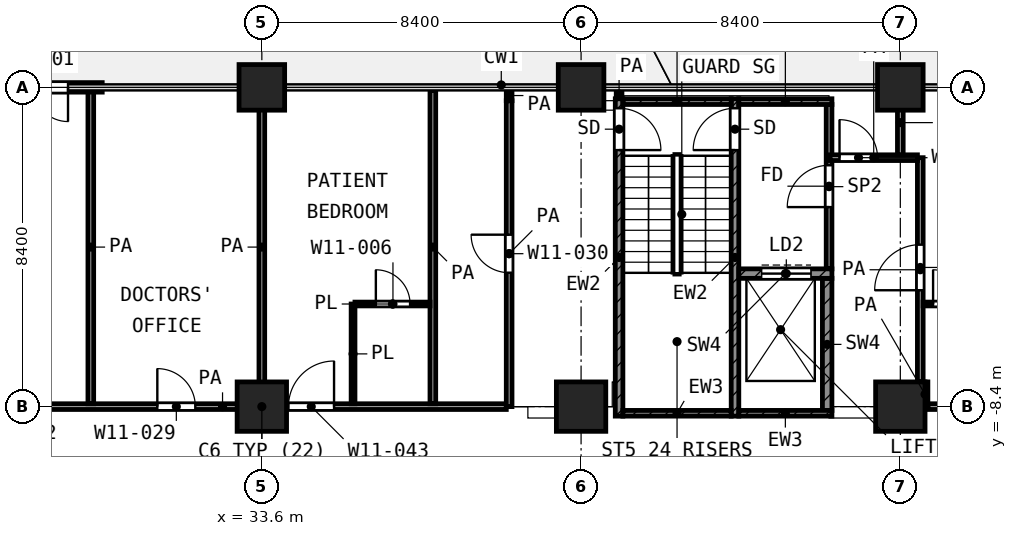
"""IFC4 building model, lengths in metres.
Left out: names, types, materials, properties, quantities, classifications, styles, units other than length and angle.
Written with IfcOpenShell. Run it as: python <this file> out.ifc"""

import sys

from ifc_helpers import new_model, si_unit, direction, frame, frame_2d, origin, origin_2d, place, context, subcontext, project, spatial, rectangle, extrude, element, fill, save


model = new_model("IFC4")
c1 = context("Model", 3, precision=1e-05, world=origin(), true_north=direction((0.0, 1.0)))
c2 = subcontext(c1, "Body", "Model", "MODEL_VIEW")
j1 = project(units=[si_unit("LENGTHUNIT", "METRE"), si_unit("PLANEANGLEUNIT", "RADIAN")], contexts=[c1])
p1 = place(None, origin())
s1 = spatial("IfcSite", under=j1, at=p1, CompositionType="ELEMENT")
p2 = place(p1, origin())
s2 = spatial("IfcBuilding", under=s1, at=p2, CompositionType="ELEMENT")
p3 = place(p2, frame((0.0, 0.0, 51.8)))
s3 = spatial("IfcBuildingStorey", under=s2, at=p3, CompositionType="ELEMENT", Elevation=51.8)
for number, where, z_axis, x_axis in (
    (1, (33.6, 0.0, 0.0), (0.0, 0.0, 1.0), (1.0, 0.0, 0.0)),
    (2, (42.0, 0.0, 0.0), (0.0, 0.0, 1.0), (1.0, 0.0, 0.0)),
    (3, (50.4, 0.0, 0.0), (0.0, 0.0, 1.0), (1.0, 0.0, 0.0)),
):
    element("IfcColumn", number, at=place(p3, frame(where, z_axis=z_axis, x_axis=x_axis)), inside=s3, PredefinedType="COLUMN", context=c2, shape_type="SweptSolid", body=[
        extrude(rectangle(XDim=1.2, YDim=1.2, at=origin_2d()), origin(), (0.0, 0.0, 1.0), 4.2),
    ])
for number, where, z_axis, x_axis in (
    (4, (33.6, -8.4, 0.0), (0.0, 0.0, 1.0), (1.0, 0.0, 0.0)),
    (5, (42.0, -8.4, 0.0), (0.0, 0.0, 1.0), (1.0, 0.0, 0.0)),
    (6, (50.4, -8.4, 0.0), (0.0, 0.0, 1.0), (1.0, 0.0, 0.0)),
):
    element("IfcColumn", number, at=place(p3, frame(where, z_axis=z_axis, x_axis=x_axis)), inside=s3, PredefinedType="COLUMN", context=c2, shape_type="SweptSolid", body=[
        extrude(rectangle(XDim=1.3, YDim=1.3, at=origin_2d()), origin(), (0.0, 0.0, 1.0), 4.2),
    ])
p4 = place(p3, frame((29.4, 0.0, 0.0), z_axis=(0.0, 0.0, 1.0), x_axis=(-1.0, 0.0, 0.0)))
e7 = element("IfcWall", 7, at=p4, inside=s3, PredefinedType="SOLIDWALL", context=c2, shape_type="SweptSolid", body=[
    extrude(rectangle(XDim=3.6, YDim=0.25, at=frame_2d((1.8, 0.0))), origin(), (0.0, 0.0, 1.0), 3.78),
])
p5 = place(p4, frame((0.9, 0.0, 0.0)))
e8 = element("IfcOpeningElement", 8, at=p5, cuts=e7, PredefinedType="OPENING", context=c2, shape_type="SweptSolid", body=[
    extrude(rectangle(XDim=1.8, YDim=2.1, at=frame_2d((0.9, 1.05))), frame((0.0, 0.135, 0.0), z_axis=(0.0, -1.0, 0.0), x_axis=(1.0, 0.0, 0.0)), (0.0, 0.0, 1.0), 0.27),
])
p6 = place(p3, frame((43.0, -8.65, 0.0), z_axis=(0.0, 0.0, 1.0), x_axis=(0.0, 1.0, 0.0)))
e9 = element("IfcWall", 9, at=p6, inside=s3, PredefinedType="SHEAR", context=c2, shape_type="SweptSolid", body=[
    extrude(rectangle(XDim=8.35, YDim=0.2, at=frame_2d((4.175, 0.0))), origin(), (0.0, 0.0, 1.0), 3.9),
])
p7 = place(p6, frame((7.0, 0.0, 0.0)))
e10 = element("IfcOpeningElement", 10, at=p7, cuts=e9, PredefinedType="OPENING", context=c2, shape_type="SweptSolid", body=[
    extrude(rectangle(XDim=1.1, YDim=2.1, at=frame_2d((0.55, 1.05))), frame((0.0, 0.11, 0.0), z_axis=(0.0, -1.0, 0.0), x_axis=(1.0, 0.0, 0.0)), (0.0, 0.0, 1.0), 0.22),
])
p8 = place(p3, frame((46.05, -8.65, 0.0), z_axis=(0.0, 0.0, 1.0), x_axis=(0.0, 1.0, 0.0)))
e11 = element("IfcWall", 11, at=p8, inside=s3, PredefinedType="SHEAR", context=c2, shape_type="SweptSolid", body=[
    extrude(rectangle(XDim=8.35, YDim=0.2, at=frame_2d((4.175, 0.0))), origin(), (0.0, 0.0, 1.0), 3.9),
])
p9 = place(p8, frame((7.0, 0.0, 0.0)))
e12 = element("IfcOpeningElement", 12, at=p9, cuts=e11, PredefinedType="OPENING", context=c2, shape_type="SweptSolid", body=[
    extrude(rectangle(XDim=1.1, YDim=2.1, at=frame_2d((0.55, 1.05))), frame((0.0, 0.11, 0.0), z_axis=(0.0, -1.0, 0.0), x_axis=(1.0, 0.0, 0.0)), (0.0, 0.0, 1.0), 0.22),
])
p10 = place(p3, frame((43.1, -0.375, 0.0), z_axis=(0.0, 0.0, 1.0), x_axis=(1.0, 0.0, 0.0)))
e13 = element("IfcWall", 13, at=p10, inside=s3, PredefinedType="SHEAR", context=c2, shape_type="SweptSolid", body=[
    extrude(rectangle(XDim=2.85, YDim=0.15, at=frame_2d((1.425, 0.0))), origin(), (0.0, 0.0, 1.0), 3.9),
])
p11 = place(p3, frame((46.15, -0.375, 0.0), z_axis=(0.0, 0.0, 1.0), x_axis=(1.0, 0.0, 0.0)))
e14 = element("IfcWall", 14, at=p11, inside=s3, PredefinedType="SHEAR", context=c2, shape_type="SweptSolid", body=[
    extrude(rectangle(XDim=2.45, YDim=0.15, at=frame_2d((1.225, 0.0))), origin(), (0.0, 0.0, 1.0), 3.9),
])
p12 = place(p3, frame((43.1, -8.575, 0.0), z_axis=(0.0, 0.0, 1.0), x_axis=(1.0, 0.0, 0.0)))
e15 = element("IfcWall", 15, at=p12, inside=s3, PredefinedType="SHEAR", context=c2, shape_type="SweptSolid", body=[
    extrude(rectangle(XDim=2.85, YDim=0.15, at=frame_2d((1.425, 0.0))), origin(), (0.0, 0.0, 1.0), 3.9),
])
p13 = place(p3, frame((46.15, -8.575, 0.0), z_axis=(0.0, 0.0, 1.0), x_axis=(1.0, 0.0, 0.0)))
e16 = element("IfcWall", 16, at=p13, inside=s3, PredefinedType="SHEAR", context=c2, shape_type="SweptSolid", body=[
    extrude(rectangle(XDim=2.45, YDim=0.15, at=frame_2d((1.225, 0.0))), origin(), (0.0, 0.0, 1.0), 3.9),
])
p14 = place(p3, frame((46.15, -4.9, 0.0), z_axis=(0.0, 0.0, 1.0), x_axis=(1.0, 0.0, 0.0)))
e17 = element("IfcWall", 17, at=p14, inside=s3, PredefinedType="SHEAR", context=c2, shape_type="SweptSolid", body=[
    extrude(rectangle(XDim=2.45, YDim=0.25, at=frame_2d((1.225, 0.0))), origin(), (0.0, 0.0, 1.0), 3.9),
])
p15 = place(p14, frame((0.6, 0.0, 0.0)))
e18 = element("IfcOpeningElement", 18, at=p15, cuts=e17, PredefinedType="OPENING", context=c2, shape_type="SweptSolid", body=[
    extrude(rectangle(XDim=1.3, YDim=2.1, at=frame_2d((0.65, 1.05))), frame((0.0, 0.135, 0.0), z_axis=(0.0, -1.0, 0.0), x_axis=(1.0, 0.0, 0.0)), (0.0, 0.0, 1.0), 0.27),
])
p16 = place(p3, frame((48.475, -8.5, 0.0), z_axis=(0.0, 0.0, 1.0), x_axis=(0.0, 1.0, 0.0)))
e19 = element("IfcWall", 19, at=p16, inside=s3, PredefinedType="SHEAR", context=c2, shape_type="SweptSolid", body=[
    extrude(rectangle(XDim=3.475, YDim=0.25, at=frame_2d((1.738, 0.0))), origin(), (0.0, 0.0, 1.0), 3.9),
])
p17 = place(p3, frame((48.525, -4.775, 0.0), z_axis=(0.0, 0.0, 1.0), x_axis=(0.0, 1.0, 0.0)))
e20 = element("IfcWall", 20, at=p17, inside=s3, PredefinedType="PARTITIONING", context=c2, shape_type="SweptSolid", body=[
    extrude(rectangle(XDim=4.325, YDim=0.15, at=frame_2d((2.163, 0.0))), origin(), (0.0, 0.0, 1.0), 3.9),
])
p18 = place(p17, frame((1.625, 0.0, 0.0)))
e21 = element("IfcOpeningElement", 21, at=p18, cuts=e20, PredefinedType="OPENING", context=c2, shape_type="SweptSolid", body=[
    extrude(rectangle(XDim=1.1, YDim=2.1, at=frame_2d((0.55, 1.05))), frame((0.0, 0.085, 0.0), z_axis=(0.0, -1.0, 0.0), x_axis=(1.0, 0.0, 0.0)), (0.0, 0.0, 1.0), 0.17),
])
p19 = place(p3, frame((36.05, -5.7, 0.0), z_axis=(0.0, 0.0, 1.0), x_axis=(1.0, 0.0, 0.0)))
e22 = element("IfcWall", 22, at=p19, inside=s3, PredefinedType="PARTITIONING", context=c2, shape_type="SweptSolid", body=[
    extrude(rectangle(XDim=1.975, YDim=0.1, at=frame_2d((0.987, 0.0))), origin(), (0.0, 0.0, 1.0), 3.9),
])
p20 = place(p19, frame((0.55, 0.0, 0.0)))
e23 = element("IfcOpeningElement", 23, at=p20, cuts=e22, PredefinedType="OPENING", context=c2, shape_type="SweptSolid", body=[
    extrude(rectangle(XDim=0.9, YDim=2.1, at=frame_2d((0.45, 1.05))), frame((0.0, 0.06, 0.0), z_axis=(0.0, -1.0, 0.0), x_axis=(1.0, 0.0, 0.0)), (0.0, 0.0, 1.0), 0.12),
])
p21 = place(p3, frame((51.0, -5.7, 0.0), z_axis=(0.0, 0.0, 1.0), x_axis=(1.0, 0.0, 0.0)))
e24 = element("IfcWall", 24, at=p21, inside=s3, PredefinedType="PARTITIONING", context=c2, shape_type="SweptSolid", body=[
    extrude(rectangle(XDim=1.45, YDim=0.1, at=frame_2d((0.725, 0.0))), origin(), (0.0, 0.0, 1.0), 3.9),
])
p22 = place(p21, frame((0.262, 0.0, 0.0)))
e25 = element("IfcOpeningElement", 25, at=p22, cuts=e24, PredefinedType="OPENING", context=c2, shape_type="SweptSolid", body=[
    extrude(rectangle(XDim=0.9, YDim=2.1, at=frame_2d((0.45, 1.05))), frame((0.0, 0.06, 0.0), z_axis=(0.0, -1.0, 0.0), x_axis=(1.0, 0.0, 0.0)), (0.0, 0.0, 1.0), 0.12),
])
p23 = place(p3, frame((36.0, -8.325, 0.0), z_axis=(0.0, 0.0, 1.0), x_axis=(0.0, 1.0, 0.0)))
e26 = element("IfcWall", 26, at=p23, inside=s3, PredefinedType="PARTITIONING", context=c2, shape_type="SweptSolid", body=[
    extrude(rectangle(XDim=2.625, YDim=0.1, at=frame_2d((1.312, 0.0))), origin(), (0.0, 0.0, 1.0), 3.9),
])
p24 = place(p3, frame((25.1, -8.4, 0.0), z_axis=(0.0, 0.0, 1.0), x_axis=(1.0, 0.0, 0.0)))
e27 = element("IfcWall", 27, at=p24, inside=s3, PredefinedType="PARTITIONING", context=c2, shape_type="SweptSolid", body=[
    extrude(rectangle(XDim=14.932, YDim=0.15, at=frame_2d((7.466, 0.0))), origin(), (0.0, 0.0, 1.0), 3.9),
])
p25 = place(p24, frame((1.45, 0.0, 0.0)))
e28 = element("IfcOpeningElement", 28, at=p25, cuts=e27, PredefinedType="OPENING", context=c2, shape_type="SweptSolid", body=[
    extrude(rectangle(XDim=1.2, YDim=2.1, at=frame_2d((0.6, 1.05))), frame((0.0, 0.085, 0.0), z_axis=(0.0, -1.0, 0.0), x_axis=(1.0, 0.0, 0.0)), (0.0, 0.0, 1.0), 0.17),
])
p26 = place(p24, frame((5.75, 0.0, 0.0)))
e29 = element("IfcOpeningElement", 29, at=p26, cuts=e27, PredefinedType="OPENING", context=c2, shape_type="SweptSolid", body=[
    extrude(rectangle(XDim=1.0, YDim=2.1, at=frame_2d((0.5, 1.05))), frame((0.0, 0.085, 0.0), z_axis=(0.0, -1.0, 0.0), x_axis=(1.0, 0.0, 0.0)), (0.0, 0.0, 1.0), 0.17),
])
p27 = place(p24, frame((9.2, 0.0, 0.0)))
e30 = element("IfcOpeningElement", 30, at=p27, cuts=e27, PredefinedType="OPENING", context=c2, shape_type="SweptSolid", body=[
    extrude(rectangle(XDim=1.2, YDim=2.1, at=frame_2d((0.6, 1.05))), frame((0.0, 0.085, 0.0), z_axis=(0.0, -1.0, 0.0), x_axis=(1.0, 0.0, 0.0)), (0.0, 0.0, 1.0), 0.17),
])
p28 = place(p3, frame((51.125, -8.4, 0.0), z_axis=(0.0, 0.0, 1.0), x_axis=(1.0, 0.0, 0.0)))
e31 = element("IfcWall", 31, at=p28, inside=s3, PredefinedType="PARTITIONING", context=c2, shape_type="SweptSolid", body=[
    extrude(rectangle(XDim=28.595, YDim=0.15, at=frame_2d((14.297, 0.0))), origin(), (0.0, 0.0, 1.0), 3.9),
])
p29 = place(p28, frame((1.825, 0.0, 0.0)))
e32 = element("IfcOpeningElement", 32, at=p29, cuts=e31, PredefinedType="OPENING", context=c2, shape_type="SweptSolid", body=[
    extrude(rectangle(XDim=1.2, YDim=2.1, at=frame_2d((0.6, 1.05))), frame((0.0, 0.085, 0.0), z_axis=(0.0, -1.0, 0.0), x_axis=(1.0, 0.0, 0.0)), (0.0, 0.0, 1.0), 0.17),
])
p30 = place(p28, frame((3.375, 0.0, 0.0)))
e33 = element("IfcOpeningElement", 33, at=p30, cuts=e31, PredefinedType="OPENING", context=c2, shape_type="SweptSolid", body=[
    extrude(rectangle(XDim=1.2, YDim=2.1, at=frame_2d((0.6, 1.05))), frame((0.0, 0.085, 0.0), z_axis=(0.0, -1.0, 0.0), x_axis=(1.0, 0.0, 0.0)), (0.0, 0.0, 1.0), 0.17),
])
p31 = place(p28, frame((5.775, 0.0, 0.0)))
e34 = element("IfcOpeningElement", 34, at=p31, cuts=e31, PredefinedType="OPENING", context=c2, shape_type="SweptSolid", body=[
    extrude(rectangle(XDim=1.2, YDim=2.1, at=frame_2d((0.6, 1.05))), frame((0.0, 0.085, 0.0), z_axis=(0.0, -1.0, 0.0), x_axis=(1.0, 0.0, 0.0)), (0.0, 0.0, 1.0), 0.17),
])
p32 = place(p28, frame((8.375, 0.0, 0.0)))
e35 = element("IfcOpeningElement", 35, at=p32, cuts=e31, PredefinedType="OPENING", context=c2, shape_type="SweptSolid", body=[
    extrude(rectangle(XDim=1.2, YDim=2.1, at=frame_2d((0.6, 1.05))), frame((0.0, 0.085, 0.0), z_axis=(0.0, -1.0, 0.0), x_axis=(1.0, 0.0, 0.0)), (0.0, 0.0, 1.0), 0.17),
])
p33 = place(p28, frame((13.675, 0.0, 0.0)))
e36 = element("IfcOpeningElement", 36, at=p33, cuts=e31, PredefinedType="OPENING", context=c2, shape_type="SweptSolid", body=[
    extrude(rectangle(XDim=1.2, YDim=2.1, at=frame_2d((0.6, 1.05))), frame((0.0, 0.085, 0.0), z_axis=(0.0, -1.0, 0.0), x_axis=(1.0, 0.0, 0.0)), (0.0, 0.0, 1.0), 0.17),
])
p34 = place(p28, frame((16.775, 0.0, 0.0)))
e37 = element("IfcOpeningElement", 37, at=p34, cuts=e31, PredefinedType="OPENING", context=c2, shape_type="SweptSolid", body=[
    extrude(rectangle(XDim=0.9, YDim=2.1, at=frame_2d((0.45, 1.05))), frame((0.0, 0.085, 0.0), z_axis=(0.0, -1.0, 0.0), x_axis=(1.0, 0.0, 0.0)), (0.0, 0.0, 1.0), 0.17),
])
p35 = place(p28, frame((22.275, 0.0, 0.0)))
e38 = element("IfcOpeningElement", 38, at=p35, cuts=e31, PredefinedType="OPENING", context=c2, shape_type="SweptSolid", body=[
    extrude(rectangle(XDim=1.5, YDim=2.1, at=frame_2d((0.75, 1.05))), frame((0.0, 0.085, 0.0), z_axis=(0.0, -1.0, 0.0), x_axis=(1.0, 0.0, 0.0)), (0.0, 0.0, 1.0), 0.17),
])
p36 = place(p3, frame((48.55, -1.85, 0.0), z_axis=(0.0, 0.0, 1.0), x_axis=(1.0, 0.0, 0.0)))
e39 = element("IfcWall", 39, at=p36, inside=s3, PredefinedType="PARTITIONING", context=c2, shape_type="SweptSolid", body=[
    extrude(rectangle(XDim=2.3, YDim=0.15, at=frame_2d((1.15, 0.0))), origin(), (0.0, 0.0, 1.0), 3.9),
])
p37 = place(p36, frame((0.25, 0.0, 0.0)))
e40 = element("IfcOpeningElement", 40, at=p37, cuts=e39, PredefinedType="OPENING", context=c2, shape_type="SweptSolid", body=[
    extrude(rectangle(XDim=1.0, YDim=2.1, at=frame_2d((0.5, 1.05))), frame((0.0, 0.085, 0.0), z_axis=(0.0, -1.0, 0.0), x_axis=(1.0, 0.0, 0.0)), (0.0, 0.0, 1.0), 0.17),
])
for number, where, z_axis, x_axis in (
    (41, (29.1, -8.325, 0.0), (0.0, 0.0, 1.0), (0.0, 1.0, 0.0)),
    (42, (33.6, -8.325, 0.0), (0.0, 0.0, 1.0), (0.0, 1.0, 0.0)),
    (43, (38.1, -8.325, 0.0), (0.0, 0.0, 1.0), (0.0, 1.0, 0.0)),
):
    element("IfcWall", number, at=place(p3, frame(where, z_axis=z_axis, x_axis=x_axis)), inside=s3, PredefinedType="PARTITIONING", context=c2, shape_type="SweptSolid", body=[
        extrude(rectangle(XDim=8.245, YDim=0.15, at=frame_2d((4.123, 0.0))), origin(), (0.0, 0.0, 1.0), 3.9),
    ])
p38 = place(p3, frame((40.107, -8.4, 0.0), z_axis=(0.0, 0.0, 1.0), x_axis=(0.0, 1.0, 0.0)))
e44 = element("IfcWall", 44, at=p38, inside=s3, PredefinedType="PARTITIONING", context=c2, shape_type="SweptSolid", body=[
    extrude(rectangle(XDim=8.048, YDim=0.15, at=frame_2d((4.024, 0.0))), origin(), (0.0, 0.0, 1.0), 3.9),
])
p39 = place(p38, frame((3.524, 0.0, 0.0)))
e45 = element("IfcOpeningElement", 45, at=p39, cuts=e44, PredefinedType="OPENING", context=c2, shape_type="SweptSolid", body=[
    extrude(rectangle(XDim=1.0, YDim=2.1, at=frame_2d((0.5, 1.05))), frame((0.0, 0.085, 0.0), z_axis=(0.0, -1.0, 0.0), x_axis=(1.0, 0.0, 0.0)), (0.0, 0.0, 1.0), 0.17),
])
p40 = place(p3, frame((40.107, -0.35, 0.0), z_axis=(0.0, 0.0, 1.0), x_axis=(0.0, 1.0, 0.0)))
e46 = element("IfcWall", 46, at=p40, inside=s3, PredefinedType="PARTITIONING", context=c2, shape_type="SweptSolid", body=[
    extrude(rectangle(XDim=0.27, YDim=0.15, at=frame_2d((0.135, 0.0))), origin(), (0.0, 0.0, 1.0), 3.9),
])
p41 = place(p3, frame((43.0, -0.27, 0.0), z_axis=(0.0, 0.0, 1.0), x_axis=(0.0, 1.0, 0.0)))
e47 = element("IfcWall", 47, at=p41, inside=s3, PredefinedType="PARTITIONING", context=c2, shape_type="SweptSolid", body=[
    extrude(rectangle(XDim=0.19, YDim=0.15, at=frame_2d((0.095, 0.0))), origin(), (0.0, 0.0, 1.0), 3.9),
])
p42 = place(p3, frame((50.4, -1.775, 0.0), z_axis=(0.0, 0.0, 1.0), x_axis=(0.0, 1.0, 0.0)))
e48 = element("IfcWall", 48, at=p42, inside=s3, PredefinedType="PARTITIONING", context=c2, shape_type="SweptSolid", body=[
    extrude(rectangle(XDim=1.695, YDim=0.15, at=frame_2d((0.847, 0.0))), origin(), (0.0, 0.0, 1.0), 3.9),
])
p43 = place(p3, frame((50.925, -7.748, 0.0), z_axis=(0.0, 0.0, 1.0), x_axis=(0.0, 1.0, 0.0)))
e49 = element("IfcWall", 49, at=p43, inside=s3, PredefinedType="PARTITIONING", context=c2, shape_type="SweptSolid", body=[
    extrude(rectangle(XDim=5.898, YDim=0.15, at=frame_2d((2.949, 0.0))), origin(), (0.0, 0.0, 1.0), 3.9),
])
p44 = place(p43, frame((2.41, 0.0, 0.0)))
e50 = element("IfcOpeningElement", 50, at=p44, cuts=e49, PredefinedType="OPENING", context=c2, shape_type="SweptSolid", body=[
    extrude(rectangle(XDim=1.2, YDim=2.1, at=frame_2d((0.6, 1.05))), frame((0.0, 0.085, 0.0), z_axis=(0.0, -1.0, 0.0), x_axis=(1.0, 0.0, 0.0)), (0.0, 0.0, 1.0), 0.17),
])
p45 = place(p3, frame((51.05, -8.4, 0.0), z_axis=(0.0, 0.0, 1.0), x_axis=(0.0, 1.0, 0.0)))
e51 = element("IfcWall", 51, at=p45, inside=s3, PredefinedType="PARTITIONING", context=c2, shape_type="SweptSolid", body=[
    extrude(rectangle(XDim=0.65, YDim=0.15, at=frame_2d((0.325, 0.0))), origin(), (0.0, 0.0, 1.0), 3.9),
])
p46 = place(p5, origin())
e52 = element("IfcDoor", 52, at=p46, inside=s3, OperationType="DOUBLE_DOOR_SINGLE_SWING", PredefinedType="DOOR", context=c2, shape_type="SweptSolid", body=[
    extrude(rectangle(XDim=1.8, YDim=2.1, at=frame_2d((0.9, 1.05))), frame((0.0, 0.025, 0.0), z_axis=(0.0, -1.0, 0.0), x_axis=(1.0, 0.0, 0.0)), (0.0, 0.0, 1.0), 0.05),
])
fill(e8, e52)
p47 = place(p7, frame((1.1, 0.0, 0.0), z_axis=(0.0, 0.0, 1.0), x_axis=(-1.0, 0.0, 0.0)))
e53 = element("IfcDoor", 53, at=p47, inside=s3, OperationType="SINGLE_SWING_LEFT", PredefinedType="DOOR", context=c2, shape_type="SweptSolid", body=[
    extrude(rectangle(XDim=1.1, YDim=2.1, at=frame_2d((0.55, 1.05))), frame((0.0, 0.025, 0.0), z_axis=(0.0, -1.0, 0.0), x_axis=(1.0, 0.0, 0.0)), (0.0, 0.0, 1.0), 0.05),
])
fill(e10, e53)
p48 = place(p9, origin())
e54 = element("IfcDoor", 54, at=p48, inside=s3, OperationType="SINGLE_SWING_LEFT", PredefinedType="DOOR", context=c2, shape_type="SweptSolid", body=[
    extrude(rectangle(XDim=1.1, YDim=2.1, at=frame_2d((0.55, 1.05))), frame((0.0, 0.025, 0.0), z_axis=(0.0, -1.0, 0.0), x_axis=(1.0, 0.0, 0.0)), (0.0, 0.0, 1.0), 0.05),
])
fill(e12, e54)
p49 = place(p15, origin())
e55 = element("IfcDoor", 55, at=p49, inside=s3, OperationType="DOUBLE_DOOR_SLIDING", PredefinedType="DOOR", context=c2, shape_type="SweptSolid", body=[
    extrude(rectangle(XDim=1.3, YDim=2.1, at=frame_2d((0.65, 1.05))), frame((0.0, 0.025, 0.0), z_axis=(0.0, -1.0, 0.0), x_axis=(1.0, 0.0, 0.0)), (0.0, 0.0, 1.0), 0.05),
])
fill(e18, e55)
p50 = place(p18, origin())
e56 = element("IfcDoor", 56, at=p50, inside=s3, OperationType="SINGLE_SWING_LEFT", PredefinedType="DOOR", context=c2, shape_type="SweptSolid", body=[
    extrude(rectangle(XDim=1.1, YDim=2.1, at=frame_2d((0.55, 1.05))), frame((0.0, 0.025, 0.0), z_axis=(0.0, -1.0, 0.0), x_axis=(1.0, 0.0, 0.0)), (0.0, 0.0, 1.0), 0.05),
])
fill(e21, e56)
p51 = place(p26, origin())
e57 = element("IfcDoor", 57, at=p51, inside=s3, OperationType="SINGLE_SWING_LEFT", PredefinedType="DOOR", context=c2, shape_type="SweptSolid", body=[
    extrude(rectangle(XDim=1.0, YDim=2.1, at=frame_2d((0.5, 1.05))), frame((0.0, 0.025, 0.0), z_axis=(0.0, -1.0, 0.0), x_axis=(1.0, 0.0, 0.0)), (0.0, 0.0, 1.0), 0.05),
])
fill(e29, e57)
p52 = place(p27, origin())
e58 = element("IfcDoor", 58, at=p52, inside=s3, OperationType="SINGLE_SWING_RIGHT", PredefinedType="DOOR", context=c2, shape_type="SweptSolid", body=[
    extrude(rectangle(XDim=1.2, YDim=2.1, at=frame_2d((0.6, 1.05))), frame((0.0, 0.025, 0.0), z_axis=(0.0, -1.0, 0.0), x_axis=(1.0, 0.0, 0.0)), (0.0, 0.0, 1.0), 0.05),
])
fill(e30, e58)
p53 = place(p20, origin())
e59 = element("IfcDoor", 59, at=p53, inside=s3, OperationType="SINGLE_SWING_LEFT", PredefinedType="DOOR", context=c2, shape_type="SweptSolid", body=[
    extrude(rectangle(XDim=0.9, YDim=2.1, at=frame_2d((0.45, 1.05))), frame((0.0, 0.025, 0.0), z_axis=(0.0, -1.0, 0.0), x_axis=(1.0, 0.0, 0.0)), (0.0, 0.0, 1.0), 0.05),
])
fill(e23, e59)
p54 = place(p39, origin())
e60 = element("IfcDoor", 60, at=p54, inside=s3, OperationType="SINGLE_SWING_RIGHT", PredefinedType="DOOR", context=c2, shape_type="SweptSolid", body=[
    extrude(rectangle(XDim=1.0, YDim=2.1, at=frame_2d((0.5, 1.05))), frame((0.0, 0.025, 0.0), z_axis=(0.0, -1.0, 0.0), x_axis=(1.0, 0.0, 0.0)), (0.0, 0.0, 1.0), 0.05),
])
fill(e45, e60)
p55 = place(p37, origin())
e61 = element("IfcDoor", 61, at=p55, inside=s3, OperationType="SINGLE_SWING_LEFT", PredefinedType="DOOR", context=c2, shape_type="SweptSolid", body=[
    extrude(rectangle(XDim=1.0, YDim=2.1, at=frame_2d((0.5, 1.05))), frame((0.0, 0.025, 0.0), z_axis=(0.0, -1.0, 0.0), x_axis=(1.0, 0.0, 0.0)), (0.0, 0.0, 1.0), 0.05),
])
fill(e40, e61)
p56 = place(p44, origin())
e62 = element("IfcDoor", 62, at=p56, inside=s3, OperationType="SINGLE_SWING_LEFT", PredefinedType="DOOR", context=c2, shape_type="SweptSolid", body=[
    extrude(rectangle(XDim=1.2, YDim=2.1, at=frame_2d((0.6, 1.05))), frame((0.0, 0.025, 0.0), z_axis=(0.0, -1.0, 0.0), x_axis=(1.0, 0.0, 0.0)), (0.0, 0.0, 1.0), 0.05),
])
fill(e50, e62)
p57 = place(p22, origin())
e63 = element("IfcDoor", 63, at=p57, inside=s3, OperationType="SINGLE_SWING_LEFT", PredefinedType="DOOR", context=c2, shape_type="SweptSolid", body=[
    extrude(rectangle(XDim=0.9, YDim=2.1, at=frame_2d((0.45, 1.05))), frame((0.0, 0.025, 0.0), z_axis=(0.0, -1.0, 0.0), x_axis=(1.0, 0.0, 0.0)), (0.0, 0.0, 1.0), 0.05),
])
fill(e25, e63)
save(model, sys.argv[1])
